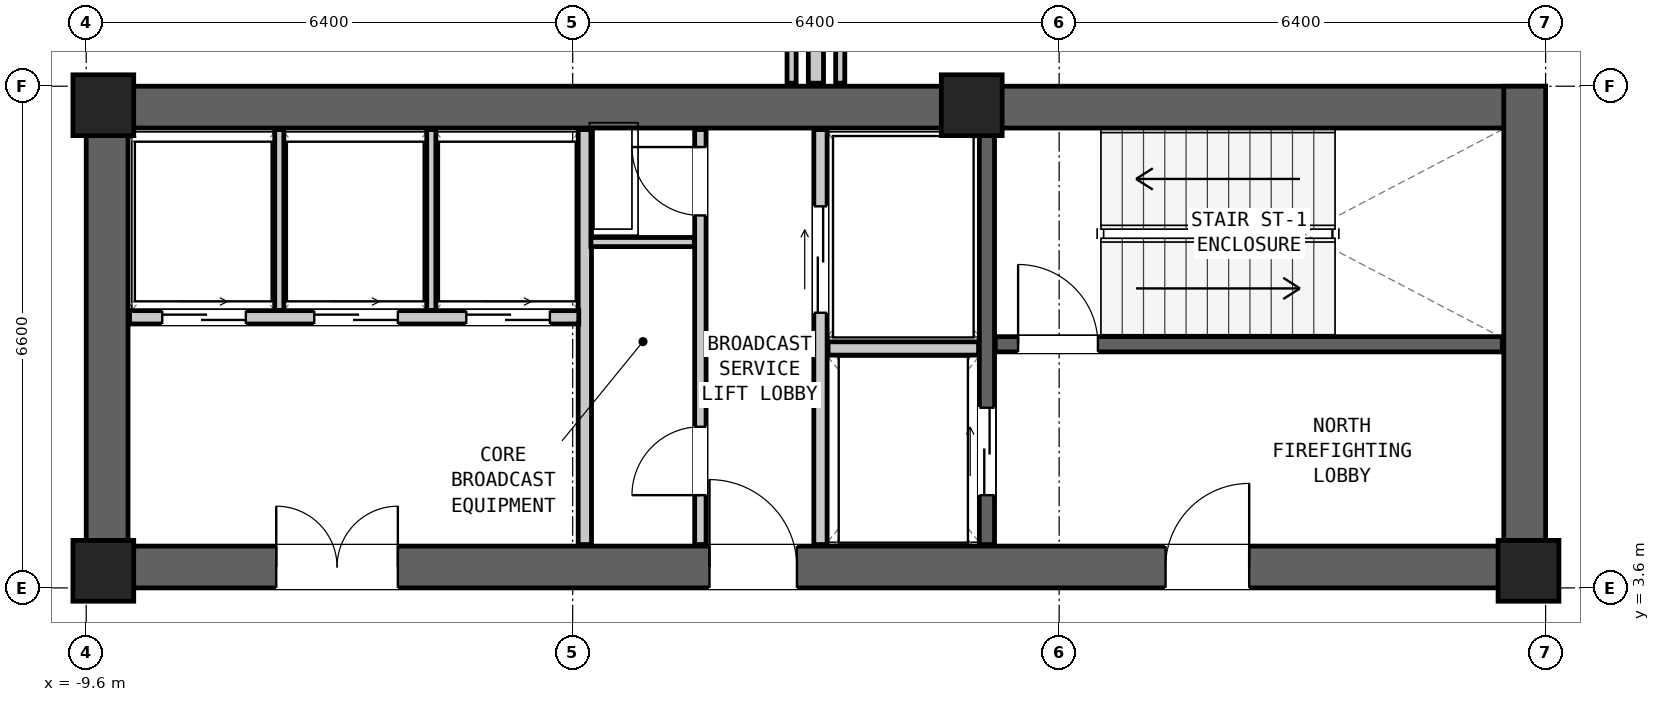
"""IFC4 building model, lengths in metres.
Left out: names, types, materials, properties, quantities, classifications, styles, units other than length and angle.
Written with IfcOpenShell. Run it as: python <this file> out.ifc"""

import sys

from ifc_helpers import new_model, si_unit, direction, frame, frame_2d, origin, origin_2d, place, context, subcontext, project, spatial, rectangle, extrude, element, fill, save


model = new_model("IFC4")
c1 = context("Model", 3, precision=1e-05, world=origin(), true_north=direction((0.0, 1.0)))
c2 = subcontext(c1, "Body", "Model", "MODEL_VIEW")
j1 = project(units=[si_unit("LENGTHUNIT", "METRE"), si_unit("PLANEANGLEUNIT", "RADIAN")], contexts=[c1])
p1 = place(None, origin())
s1 = spatial("IfcSite", under=j1, at=p1, CompositionType="ELEMENT")
p2 = place(p1, origin())
s2 = spatial("IfcBuilding", under=s1, at=p2, CompositionType="ELEMENT")
p3 = place(p2, frame((0.0, 0.0, 65.1)))
s3 = spatial("IfcBuildingStorey", under=s2, at=p3, CompositionType="ELEMENT", Elevation=65.1)
p4 = place(p3, frame((-9.6, 9.925, 0.0), z_axis=(0.0, 0.0, 1.0), x_axis=(1.0, 0.0, 0.0)))
e1 = element("IfcWall", 1, at=p4, inside=s3, PredefinedType="SHEAR", context=c2, shape_type="SweptSolid", body=[
    extrude(rectangle(XDim=19.2, YDim=0.55, at=frame_2d((9.6, 0.0))), origin(), (0.0, 0.0, 1.0), 4.35),
])
p5 = place(p3, frame((-9.6, 3.875, 0.0), z_axis=(0.0, 0.0, 1.0), x_axis=(1.0, 0.0, 0.0)))
e2 = element("IfcWall", 2, at=p5, inside=s3, PredefinedType="SHEAR", context=c2, shape_type="SweptSolid", body=[
    extrude(rectangle(XDim=19.2, YDim=0.55, at=frame_2d((9.6, 0.0))), origin(), (0.0, 0.0, 1.0), 4.35),
])
p6 = place(p5, frame((14.2, 0.0, 0.0)))
e3 = element("IfcOpeningElement", 3, at=p6, cuts=e2, PredefinedType="OPENING", context=c2, shape_type="SweptSolid", body=[
    extrude(rectangle(XDim=1.1, YDim=2.08, at=frame_2d((0.55, 1.04))), frame((0.0, 0.287, 0.0), z_axis=(0.0, -1.0, 0.0), x_axis=(1.0, 0.0, 0.0)), (0.0, 0.0, 1.0), 0.574),
])
p7 = place(p5, frame((8.2, 0.0, 0.0)))
e4 = element("IfcOpeningElement", 4, at=p7, cuts=e2, PredefinedType="OPENING", context=c2, shape_type="SweptSolid", body=[
    extrude(rectangle(XDim=1.15, YDim=2.1, at=frame_2d((0.575, 1.05))), frame((0.0, 0.287, 0.0), z_axis=(0.0, -1.0, 0.0), x_axis=(1.0, 0.0, 0.0)), (0.0, 0.0, 1.0), 0.574),
])
p8 = place(p5, frame((2.5, 0.0, 0.0)))
e5 = element("IfcOpeningElement", 5, at=p8, cuts=e2, PredefinedType="OPENING", context=c2, shape_type="SweptSolid", body=[
    extrude(rectangle(XDim=1.6, YDim=2.12, at=frame_2d((0.8, 1.06))), frame((0.0, 0.287, 0.0), z_axis=(0.0, -1.0, 0.0), x_axis=(1.0, 0.0, 0.0)), (0.0, 0.0, 1.0), 0.574),
])
for number, where, z_axis, x_axis in (
    (6, (-9.325, 3.6, 0.0), (0.0, 0.0, 1.0), (0.0, 1.0, 0.0)),
    (7, (9.325, 3.6, 0.0), (0.0, 0.0, 1.0), (0.0, 1.0, 0.0)),
):
    element("IfcWall", number, at=place(p3, frame(where, z_axis=z_axis, x_axis=x_axis)), inside=s3, PredefinedType="SHEAR", context=c2, shape_type="SweptSolid", body=[
        extrude(rectangle(XDim=6.6, YDim=0.55, at=frame_2d((3.3, 0.0))), origin(), (0.0, 0.0, 1.0), 4.35),
    ])
for number, where, z_axis, x_axis in (
    (8, (-9.375, 9.95, 0.0), (0.0, 0.0, 1.0), (1.0, 0.0, 0.0)),
    (9, (2.05, 9.95, 0.0), (0.0, 0.0, 1.0), (1.0, 0.0, 0.0)),
    (10, (-9.375, 3.825, 0.0), (0.0, 0.0, 1.0), (1.0, 0.0, 0.0)),
    (11, (9.375, 3.825, 0.0), (0.0, 0.0, 1.0), (1.0, 0.0, 0.0)),
):
    element("IfcColumn", number, at=place(p3, frame(where, z_axis=z_axis, x_axis=x_axis)), inside=s3, PredefinedType="COLUMN", context=c2, shape_type="SweptSolid", body=[
        extrude(rectangle(XDim=0.8, YDim=0.8, at=origin_2d()), origin(), (0.0, 0.0, 1.0), 4.35),
    ])
p9 = place(p3, frame((2.36, 6.805, 0.0), z_axis=(0.0, 0.0, 1.0), x_axis=(1.0, 0.0, 0.0)))
e12 = element("IfcWall", 12, at=p9, inside=s3, PredefinedType="SHEAR", context=c2, shape_type="SweptSolid", body=[
    extrude(rectangle(XDim=6.67, YDim=0.2, at=frame_2d((3.335, 0.0))), origin(), (0.0, 0.0, 1.0), 4.13),
])
p10 = place(p9, frame((0.3, 0.0, 0.0)))
e13 = element("IfcOpeningElement", 13, at=p10, cuts=e12, PredefinedType="OPENING", context=c2, shape_type="SweptSolid", body=[
    extrude(rectangle(XDim=1.05, YDim=2.08, at=frame_2d((0.525, 1.04))), frame((0.0, 0.112, 0.0), z_axis=(0.0, -1.0, 0.0), x_axis=(1.0, 0.0, 0.0)), (0.0, 0.0, 1.0), 0.224),
])
p11 = place(p3, frame((2.25, 4.17, 0.0), z_axis=(0.0, 0.0, 1.0), x_axis=(0.0, 1.0, 0.0)))
e14 = element("IfcWall", 14, at=p11, inside=s3, PredefinedType="SHEAR", context=c2, shape_type="SweptSolid", body=[
    extrude(rectangle(XDim=5.46, YDim=0.2, at=frame_2d((2.73, 0.0))), origin(), (0.0, 0.0, 1.0), 4.13),
])
p12 = place(p11, frame((0.65, 0.0, 0.0)))
e15 = element("IfcOpeningElement", 15, at=p12, cuts=e14, PredefinedType="OPENING", context=c2, shape_type="SweptSolid", body=[
    extrude(rectangle(XDim=1.15, YDim=2.08, at=frame_2d((0.575, 1.04))), frame((0.0, 0.112, 0.0), z_axis=(0.0, -1.0, 0.0), x_axis=(1.0, 0.0, 0.0)), (0.0, 0.0, 1.0), 0.224),
])
p13 = place(p3, frame((0.06, 4.17, 0.0), z_axis=(0.0, 0.0, 1.0), x_axis=(0.0, 1.0, 0.0)))
e16 = element("IfcWall", 16, at=p13, inside=s3, PredefinedType="PARTITIONING", context=c2, shape_type="SweptSolid", body=[
    extrude(rectangle(XDim=5.46, YDim=0.175, at=frame_2d((2.73, 0.0))), origin(), (0.0, 0.0, 1.0), 4.13),
])
p14 = place(p13, frame((3.05, 0.0, 0.0)))
e17 = element("IfcOpeningElement", 17, at=p14, cuts=e16, PredefinedType="OPENING", context=c2, shape_type="SweptSolid", body=[
    extrude(rectangle(XDim=1.4, YDim=2.12, at=frame_2d((0.7, 1.06))), frame((0.0, 0.1, 0.0), z_axis=(0.0, -1.0, 0.0), x_axis=(1.0, 0.0, 0.0)), (0.0, 0.0, 1.0), 0.199),
])
p15 = place(p3, frame((0.16, 6.75, 0.0), z_axis=(0.0, 0.0, 1.0), x_axis=(1.0, 0.0, 0.0)))
e18 = element("IfcWall", 18, at=p15, inside=s3, PredefinedType="PARTITIONING", context=c2, shape_type="SweptSolid", body=[
    extrude(rectangle(XDim=1.98, YDim=0.175, at=frame_2d((0.99, 0.0))), origin(), (0.0, 0.0, 1.0), 4.13),
])
p16 = place(p3, frame((-3.04, 4.17, 0.0), z_axis=(0.0, 0.0, 1.0), x_axis=(0.0, 1.0, 0.0)))
e19 = element("IfcWall", 19, at=p16, inside=s3, PredefinedType="PARTITIONING", context=c2, shape_type="SweptSolid", body=[
    extrude(rectangle(XDim=5.46, YDim=0.175, at=frame_2d((2.73, 0.0))), origin(), (0.0, 0.0, 1.0), 4.13),
])
p17 = place(p3, frame((-1.52, 4.17, 0.0), z_axis=(0.0, 0.0, 1.0), x_axis=(0.0, 1.0, 0.0)))
e20 = element("IfcWall", 20, at=p17, inside=s3, PredefinedType="PARTITIONING", context=c2, shape_type="SweptSolid", body=[
    extrude(rectangle(XDim=5.46, YDim=0.15, at=frame_2d((2.73, 0.0))), origin(), (0.0, 0.0, 1.0), 4.13),
])
p18 = place(p17, frame((4.33, 0.0, 0.0)))
e21 = element("IfcOpeningElement", 21, at=p18, cuts=e20, PredefinedType="OPENING", context=c2, shape_type="SweptSolid", body=[
    extrude(rectangle(XDim=0.9, YDim=2.05, at=frame_2d((0.45, 1.025))), frame((0.0, 0.087, 0.0), z_axis=(0.0, -1.0, 0.0), x_axis=(1.0, 0.0, 0.0)), (0.0, 0.0, 1.0), 0.174),
])
p19 = place(p17, frame((0.65, 0.0, 0.0)))
e22 = element("IfcOpeningElement", 22, at=p19, cuts=e20, PredefinedType="OPENING", context=c2, shape_type="SweptSolid", body=[
    extrude(rectangle(XDim=0.9, YDim=2.05, at=frame_2d((0.45, 1.025))), frame((0.0, 0.087, 0.0), z_axis=(0.0, -1.0, 0.0), x_axis=(1.0, 0.0, 0.0)), (0.0, 0.0, 1.0), 0.174),
])
p20 = place(p3, frame((-2.96, 8.15, 0.0), z_axis=(0.0, 0.0, 1.0), x_axis=(1.0, 0.0, 0.0)))
e23 = element("IfcWall", 23, at=p20, inside=s3, PredefinedType="PARTITIONING", context=c2, shape_type="SweptSolid", body=[
    extrude(rectangle(XDim=1.36, YDim=0.12, at=frame_2d((0.68, 0.0))), origin(), (0.0, 0.0, 1.0), 4.13),
])
p21 = place(p3, frame((-9.03, 7.16, 0.0), z_axis=(0.0, 0.0, 1.0), x_axis=(1.0, 0.0, 0.0)))
e24 = element("IfcWall", 24, at=p21, inside=s3, PredefinedType="PARTITIONING", context=c2, shape_type="SweptSolid", body=[
    extrude(rectangle(XDim=5.91, YDim=0.175, at=frame_2d((2.955, 0.0))), origin(), (0.0, 0.0, 1.0), 4.13),
])
p22 = place(p21, frame((0.43, 0.0, 0.0)))
e25 = element("IfcOpeningElement", 25, at=p22, cuts=e24, PredefinedType="OPENING", context=c2, shape_type="SweptSolid", body=[
    extrude(rectangle(XDim=1.1, YDim=2.06, at=frame_2d((0.55, 1.03))), frame((0.0, 0.1, 0.0), z_axis=(0.0, -1.0, 0.0), x_axis=(1.0, 0.0, 0.0)), (0.0, 0.0, 1.0), 0.199),
])
p23 = place(p21, frame((2.43, 0.0, 0.0)))
e26 = element("IfcOpeningElement", 26, at=p23, cuts=e24, PredefinedType="OPENING", context=c2, shape_type="SweptSolid", body=[
    extrude(rectangle(XDim=1.1, YDim=2.06, at=frame_2d((0.55, 1.03))), frame((0.0, 0.1, 0.0), z_axis=(0.0, -1.0, 0.0), x_axis=(1.0, 0.0, 0.0)), (0.0, 0.0, 1.0), 0.199),
])
p24 = place(p21, frame((4.43, 0.0, 0.0)))
e27 = element("IfcOpeningElement", 27, at=p24, cuts=e24, PredefinedType="OPENING", context=c2, shape_type="SweptSolid", body=[
    extrude(rectangle(XDim=1.1, YDim=2.06, at=frame_2d((0.55, 1.03))), frame((0.0, 0.1, 0.0), z_axis=(0.0, -1.0, 0.0), x_axis=(1.0, 0.0, 0.0)), (0.0, 0.0, 1.0), 0.199),
])
for number, where, z_axis, x_axis in (
    (28, (-7.06, 7.25, 0.0), (0.0, 0.0, 1.0), (0.0, 1.0, 0.0)),
    (29, (-5.06, 7.25, 0.0), (0.0, 0.0, 1.0), (0.0, 1.0, 0.0)),
):
    element("IfcWall", number, at=place(p3, frame(where, z_axis=z_axis, x_axis=x_axis)), inside=s3, PredefinedType="PARTITIONING", context=c2, shape_type="SweptSolid", body=[
        extrude(rectangle(XDim=2.38, YDim=0.12, at=frame_2d((1.19, 0.0))), origin(), (0.0, 0.0, 1.0), 4.13),
    ])
p25 = place(p3, frame((0.0, 10.24, 0.0), z_axis=(0.0, 0.0, 1.0), x_axis=(0.0, 1.0, 0.0)))
e30 = element("IfcWall", 30, at=p25, inside=s3, PredefinedType="PARTITIONING", context=c2, shape_type="SweptSolid", body=[
    extrude(rectangle(XDim=12.81, YDim=0.2, at=frame_2d((6.405, 0.0))), origin(), (0.0, 0.0, 1.0), 2.31),
])
for number, where, z_axis, x_axis in (
    (31, (-0.32, 10.24, 0.0), (0.0, 0.0, 1.0), (0.0, 1.0, 0.0)),
    (32, (0.32, 10.24, 0.0), (0.0, 0.0, 1.0), (0.0, 1.0, 0.0)),
):
    element("IfcWall", number, at=place(p3, frame(where, z_axis=z_axis, x_axis=x_axis)), inside=s3, PredefinedType="PARTITIONING", context=c2, shape_type="SweptSolid", body=[
        extrude(rectangle(XDim=2.36, YDim=0.12, at=frame_2d((1.18, 0.0))), origin(), (0.0, 0.0, 1.0), 2.31),
    ])
p26 = place(p10, origin())
e33 = element("IfcDoor", 33, at=p26, inside=s3, OperationType="SINGLE_SWING_LEFT", PredefinedType="DOOR", context=c2, shape_type="SweptSolid", body=[
    extrude(rectangle(XDim=1.05, YDim=2.08, at=frame_2d((0.525, 1.04))), frame((0.0, 0.025, 0.0), z_axis=(0.0, -1.0, 0.0), x_axis=(1.0, 0.0, 0.0)), (0.0, 0.0, 1.0), 0.05),
])
fill(e13, e33)
p27 = place(p6, origin())
e34 = element("IfcDoor", 34, at=p27, inside=s3, OperationType="SINGLE_SWING_RIGHT", PredefinedType="DOOR", context=c2, shape_type="SweptSolid", body=[
    extrude(rectangle(XDim=1.1, YDim=2.08, at=frame_2d((0.55, 1.04))), frame((0.0, 0.025, 0.0), z_axis=(0.0, -1.0, 0.0), x_axis=(1.0, 0.0, 0.0)), (0.0, 0.0, 1.0), 0.05),
])
fill(e3, e34)
p28 = place(p12, origin())
e35 = element("IfcDoor", 35, at=p28, inside=s3, OperationType="DOUBLE_DOOR_SLIDING", PredefinedType="DOOR", context=c2, shape_type="SweptSolid", body=[
    extrude(rectangle(XDim=1.15, YDim=2.08, at=frame_2d((0.575, 1.04))), frame((0.0, 0.025, 0.0), z_axis=(0.0, -1.0, 0.0), x_axis=(1.0, 0.0, 0.0)), (0.0, 0.0, 1.0), 0.05),
])
fill(e15, e35)
p29 = place(p14, origin())
e36 = element("IfcDoor", 36, at=p29, inside=s3, OperationType="DOUBLE_DOOR_SLIDING", PredefinedType="DOOR", context=c2, shape_type="SweptSolid", body=[
    extrude(rectangle(XDim=1.4, YDim=2.12, at=frame_2d((0.7, 1.06))), frame((0.0, 0.025, 0.0), z_axis=(0.0, -1.0, 0.0), x_axis=(1.0, 0.0, 0.0)), (0.0, 0.0, 1.0), 0.05),
])
fill(e17, e36)
p30 = place(p7, origin())
e37 = element("IfcDoor", 37, at=p30, inside=s3, OperationType="SINGLE_SWING_LEFT", PredefinedType="DOOR", context=c2, shape_type="SweptSolid", body=[
    extrude(rectangle(XDim=1.15, YDim=2.1, at=frame_2d((0.575, 1.05))), frame((0.0, 0.025, 0.0), z_axis=(0.0, -1.0, 0.0), x_axis=(1.0, 0.0, 0.0)), (0.0, 0.0, 1.0), 0.05),
])
fill(e4, e37)
p31 = place(p18, origin())
e38 = element("IfcDoor", 38, at=p31, inside=s3, OperationType="SINGLE_SWING_RIGHT", PredefinedType="DOOR", context=c2, shape_type="SweptSolid", body=[
    extrude(rectangle(XDim=0.9, YDim=2.05, at=frame_2d((0.45, 1.025))), frame((0.0, 0.025, 0.0), z_axis=(0.0, -1.0, 0.0), x_axis=(1.0, 0.0, 0.0)), (0.0, 0.0, 1.0), 0.05),
])
fill(e21, e38)
p32 = place(p19, origin())
e39 = element("IfcDoor", 39, at=p32, inside=s3, OperationType="SINGLE_SWING_LEFT", PredefinedType="DOOR", context=c2, shape_type="SweptSolid", body=[
    extrude(rectangle(XDim=0.9, YDim=2.05, at=frame_2d((0.45, 1.025))), frame((0.0, 0.025, 0.0), z_axis=(0.0, -1.0, 0.0), x_axis=(1.0, 0.0, 0.0)), (0.0, 0.0, 1.0), 0.05),
])
fill(e22, e39)
p33 = place(p22, origin())
e40 = element("IfcDoor", 40, at=p33, inside=s3, OperationType="DOUBLE_DOOR_SLIDING", PredefinedType="DOOR", context=c2, shape_type="SweptSolid", body=[
    extrude(rectangle(XDim=1.1, YDim=2.06, at=frame_2d((0.55, 1.03))), frame((0.0, 0.025, 0.0), z_axis=(0.0, -1.0, 0.0), x_axis=(1.0, 0.0, 0.0)), (0.0, 0.0, 1.0), 0.05),
])
fill(e25, e40)
p34 = place(p23, origin())
e41 = element("IfcDoor", 41, at=p34, inside=s3, OperationType="DOUBLE_DOOR_SLIDING", PredefinedType="DOOR", context=c2, shape_type="SweptSolid", body=[
    extrude(rectangle(XDim=1.1, YDim=2.06, at=frame_2d((0.55, 1.03))), frame((0.0, 0.025, 0.0), z_axis=(0.0, -1.0, 0.0), x_axis=(1.0, 0.0, 0.0)), (0.0, 0.0, 1.0), 0.05),
])
fill(e26, e41)
p35 = place(p24, origin())
e42 = element("IfcDoor", 42, at=p35, inside=s3, OperationType="DOUBLE_DOOR_SLIDING", PredefinedType="DOOR", context=c2, shape_type="SweptSolid", body=[
    extrude(rectangle(XDim=1.1, YDim=2.06, at=frame_2d((0.55, 1.03))), frame((0.0, 0.025, 0.0), z_axis=(0.0, -1.0, 0.0), x_axis=(1.0, 0.0, 0.0)), (0.0, 0.0, 1.0), 0.05),
])
fill(e27, e42)
p36 = place(p8, origin())
e43 = element("IfcDoor", 43, at=p36, inside=s3, OperationType="DOUBLE_DOOR_SINGLE_SWING", PredefinedType="DOOR", context=c2, shape_type="SweptSolid", body=[
    extrude(rectangle(XDim=1.6, YDim=2.12, at=frame_2d((0.8, 1.06))), frame((0.0, 0.025, 0.0), z_axis=(0.0, -1.0, 0.0), x_axis=(1.0, 0.0, 0.0)), (0.0, 0.0, 1.0), 0.05),
])
fill(e5, e43)
save(model, sys.argv[1])
